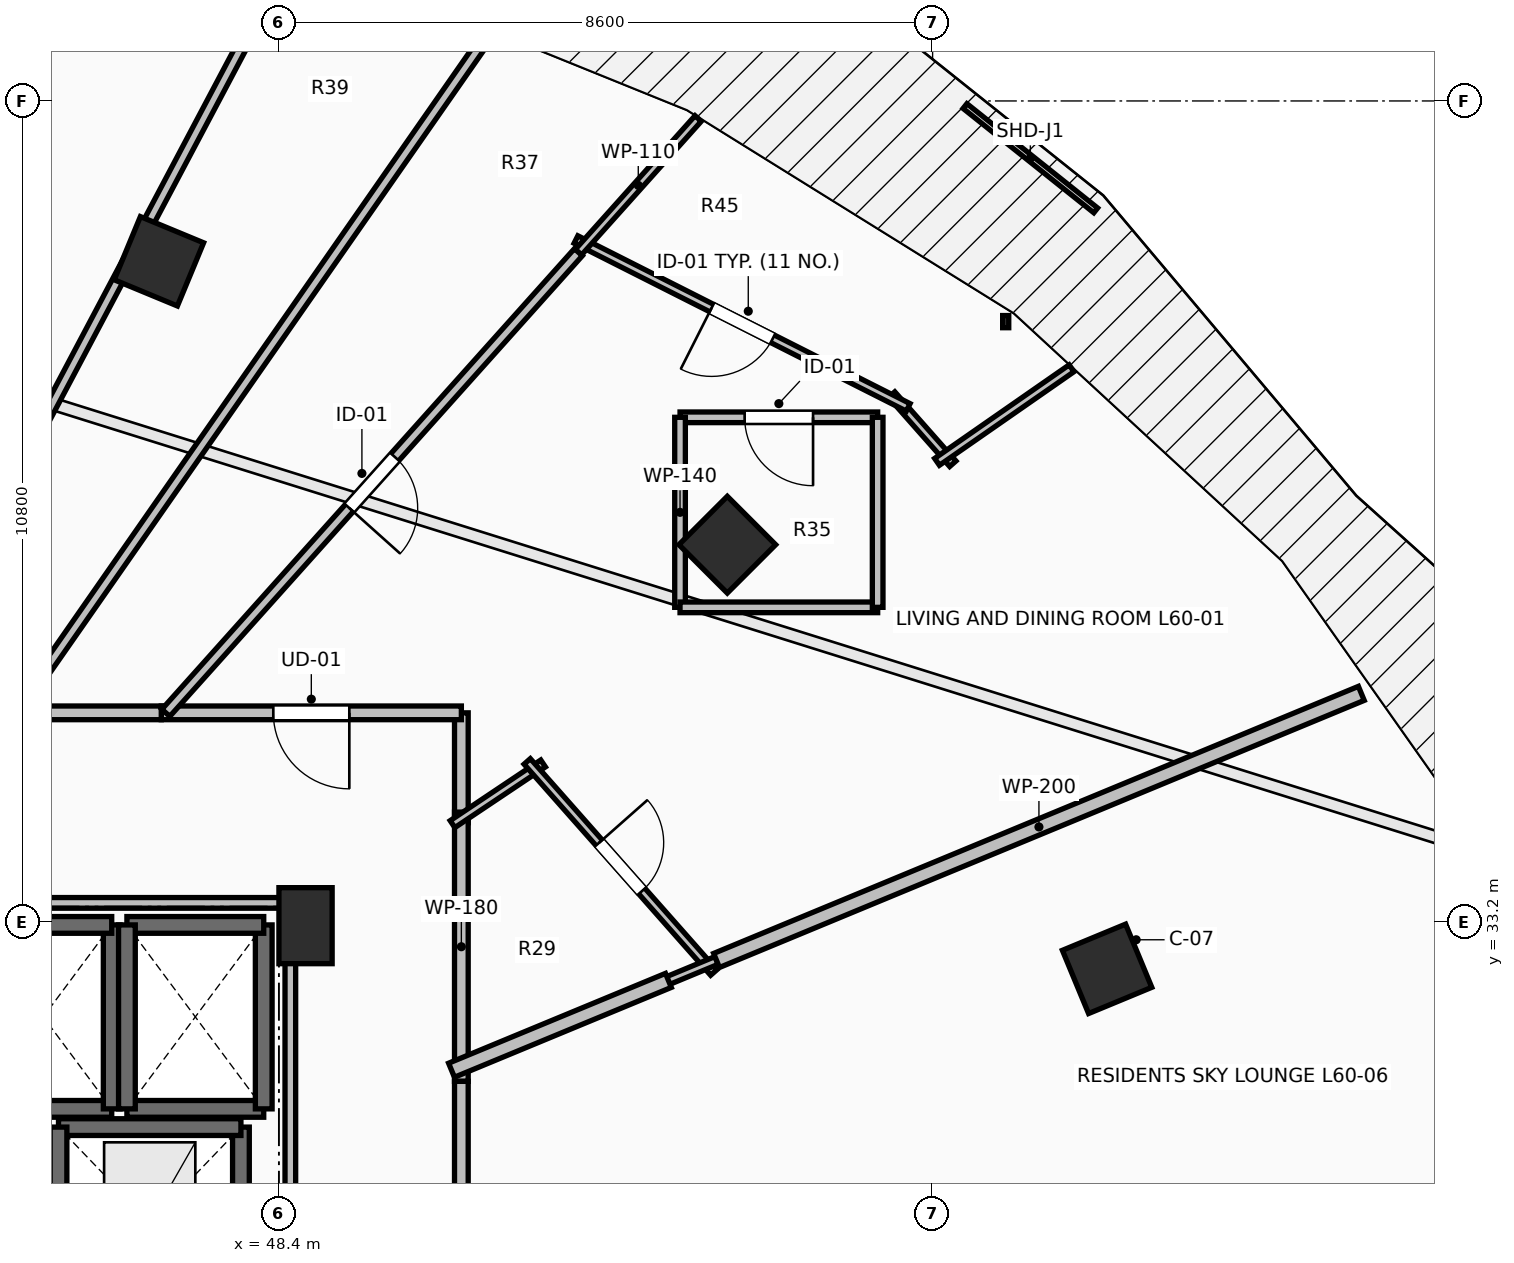
"""IFC4 building model, lengths in metres.
Left out: names, types, materials, properties, quantities, classifications, styles, units other than length and angle.
Written with IfcOpenShell. Run it as: python <this file> out.ifc"""

import sys

from ifc_helpers import new_model, si_unit, direction, frame, frame_2d, origin, origin_2d, place, context, subcontext, project, spatial, rectangle, extrude, element, fill, save


model = new_model("IFC4")
c1 = context("Model", 3, precision=1e-05, world=origin(), true_north=direction((0.0, 1.0)))
c2 = subcontext(c1, "Body", "Model", "MODEL_VIEW")
j1 = project(units=[si_unit("LENGTHUNIT", "METRE"), si_unit("PLANEANGLEUNIT", "RADIAN")], contexts=[c1])
p1 = place(None, origin())
s1 = spatial("IfcSite", under=j1, at=p1, CompositionType="ELEMENT")
p2 = place(p1, origin())
s2 = spatial("IfcBuilding", under=s1, at=p2, CompositionType="ELEMENT")
p3 = place(p2, frame((0.0, 0.0, 221.4)))
s3 = spatial("IfcBuildingStorey", under=s2, at=p3, CompositionType="ELEMENT", Elevation=221.4)
for number, where, z_axis, x_axis in (
    (1, (59.295, 32.582, 0.0), (0.0, 0.0, 1.0), (0.924, 0.383, 0.0)),
    (2, (54.299, 38.162, 0.0), (0.0, 0.0, 1.0), (0.707, 0.707, 0.0)),
    (3, (46.821, 41.891, 0.0), (0.0, 0.0, 1.0), (0.383, 0.924, 0.0)),
):
    element("IfcColumn", number, at=place(p3, frame(where, z_axis=z_axis, x_axis=x_axis)), inside=s3, PredefinedType="COLUMN", context=c2, shape_type="SweptSolid", body=[
        extrude(rectangle(XDim=0.9, YDim=0.9, at=origin_2d()), origin(), (0.0, 0.0, 1.0), 3.55),
    ])
p4 = place(p3, frame((48.75, 33.15, 0.0), z_axis=(0.0, 0.0, 1.0), x_axis=(1.0, 0.0, 0.0)))
e4 = element("IfcColumn", 4, at=p4, inside=s3, PredefinedType="PILASTER", context=c2, shape_type="SweptSolid", body=[
    extrude(rectangle(XDim=0.7, YDim=1.0, at=origin_2d()), origin(), (0.0, 0.0, 1.0), 3.55),
])
p5 = place(p3, frame((44.4, 30.74, 0.0), z_axis=(0.0, 0.0, 1.0), x_axis=(1.0, 0.0, 0.0)))
e5 = element("IfcWall", 5, at=p5, inside=s3, PredefinedType="SOLIDWALL", context=c2, shape_type="SweptSolid", body=[
    extrude(rectangle(XDim=1.8, YDim=0.22, at=frame_2d((0.9, 0.0))), origin(), (0.0, 0.0, 1.0), 3.2),
])
p6 = place(p3, frame((46.2, 30.74, 0.0), z_axis=(0.0, 0.0, 1.0), x_axis=(0.0, 1.0, 0.0)))
e6 = element("IfcWall", 6, at=p6, inside=s3, PredefinedType="SOLIDWALL", context=c2, shape_type="SweptSolid", body=[
    extrude(rectangle(XDim=2.42, YDim=0.22, at=frame_2d((1.21, 0.0))), origin(), (0.0, 0.0, 1.0), 3.2),
])
for number, where, z_axis, x_axis in (
    (7, (46.2, 33.16, 0.0), (0.0, 0.0, 1.0), (-1.0, 0.0, 0.0)),
    (8, (46.4, 30.74, 0.0), (0.0, 0.0, 1.0), (1.0, 0.0, 0.0)),
):
    element("IfcWall", number, at=place(p3, frame(where, z_axis=z_axis, x_axis=x_axis)), inside=s3, PredefinedType="SOLIDWALL", context=c2, shape_type="SweptSolid", body=[
        extrude(rectangle(XDim=1.8, YDim=0.22, at=frame_2d((0.9, 0.0))), origin(), (0.0, 0.0, 1.0), 3.2),
    ])
p7 = place(p3, frame((48.2, 30.74, 0.0), z_axis=(0.0, 0.0, 1.0), x_axis=(0.0, 1.0, 0.0)))
e9 = element("IfcWall", 9, at=p7, inside=s3, PredefinedType="SOLIDWALL", context=c2, shape_type="SweptSolid", body=[
    extrude(rectangle(XDim=2.42, YDim=0.22, at=frame_2d((1.21, 0.0))), origin(), (0.0, 0.0, 1.0), 3.2),
])
p8 = place(p3, frame((48.2, 33.16, 0.0), z_axis=(0.0, 0.0, 1.0), x_axis=(-1.0, 0.0, 0.0)))
e10 = element("IfcWall", 10, at=p8, inside=s3, PredefinedType="SOLIDWALL", context=c2, shape_type="SweptSolid", body=[
    extrude(rectangle(XDim=1.8, YDim=0.22, at=frame_2d((0.9, 0.0))), origin(), (0.0, 0.0, 1.0), 3.2),
])
p9 = place(p3, frame((46.4, 33.16, 0.0), z_axis=(0.0, 0.0, 1.0), x_axis=(0.0, -1.0, 0.0)))
e11 = element("IfcWall", 11, at=p9, inside=s3, PredefinedType="SOLIDWALL", context=c2, shape_type="SweptSolid", body=[
    extrude(rectangle(XDim=2.42, YDim=0.22, at=frame_2d((1.21, 0.0))), origin(), (0.0, 0.0, 1.0), 3.2),
])
p10 = place(p3, frame((47.9, 28.0, 0.0), z_axis=(0.0, 0.0, 1.0), x_axis=(0.0, 1.0, 0.0)))
e12 = element("IfcWall", 12, at=p10, inside=s3, PredefinedType="SHEAR", context=c2, shape_type="SweptSolid", body=[
    extrude(rectangle(XDim=2.5, YDim=0.22, at=frame_2d((1.25, 0.0))), origin(), (0.0, 0.0, 1.0), 3.2),
])
p11 = place(p3, frame((47.9, 30.5, 0.0), z_axis=(0.0, 0.0, 1.0), x_axis=(-1.0, 0.0, 0.0)))
e13 = element("IfcWall", 13, at=p11, inside=s3, PredefinedType="SHEAR", context=c2, shape_type="SweptSolid", body=[
    extrude(rectangle(XDim=2.4, YDim=0.22, at=frame_2d((1.2, 0.0))), origin(), (0.0, 0.0, 1.0), 3.2),
])
p12 = place(p3, frame((45.5, 30.5, 0.0), z_axis=(0.0, 0.0, 1.0), x_axis=(0.0, -1.0, 0.0)))
e14 = element("IfcWall", 14, at=p12, inside=s3, PredefinedType="SHEAR", context=c2, shape_type="SweptSolid", body=[
    extrude(rectangle(XDim=2.5, YDim=0.22, at=frame_2d((1.25, 0.0))), origin(), (0.0, 0.0, 1.0), 3.2),
])
p13 = place(p3, frame((50.8, 34.504, 0.0), z_axis=(0.0, 0.0, 1.0), x_axis=(0.0, 1.0, 0.0)))
e15 = element("IfcWall", 15, at=p13, inside=s3, PredefinedType="PARTITIONING", context=c2, shape_type="SweptSolid", body=[
    extrude(rectangle(XDim=1.446, YDim=0.18, at=frame_2d((0.723, 0.0))), origin(), (0.0, 0.0, 1.0), 2.392),
])
p14 = place(p3, frame((50.8, 35.95, 0.0), z_axis=(0.0, 0.0, 1.0), x_axis=(-1.0, 0.0, 0.0)))
e16 = element("IfcWall", 16, at=p14, inside=s3, PredefinedType="PARTITIONING", context=c2, shape_type="SweptSolid", body=[
    extrude(rectangle(XDim=3.948, YDim=0.18, at=frame_2d((1.974, 0.0))), origin(), (0.0, 0.0, 1.0), 2.392),
])
p15 = place(p14, frame((1.474, 0.0, 0.0)))
e17 = element("IfcOpeningElement", 17, at=p15, cuts=e16, PredefinedType="OPENING", context=c2, shape_type="SweptSolid", body=[
    extrude(rectangle(XDim=1.0, YDim=2.15, at=frame_2d((0.5, 1.075))), frame((0.0, 0.105, 0.0), z_axis=(0.0, -1.0, 0.0), x_axis=(1.0, 0.0, 0.0)), (0.0, 0.0, 1.0), 0.21),
])
p16 = place(p3, frame((50.8, 31.102, 0.0), z_axis=(0.0, 0.0, 1.0), x_axis=(0.0, 1.0, 0.0)))
e18 = element("IfcWall", 18, at=p16, inside=s3, PredefinedType="PARTITIONING", context=c2, shape_type="SweptSolid", body=[
    extrude(rectangle(XDim=3.542, YDim=0.18, at=frame_2d((1.771, 0.0))), origin(), (0.0, 0.0, 1.0), 2.392),
])
p17 = place(p3, frame((46.852, 35.95, 0.0), z_axis=(0.0, 0.0, 1.0), x_axis=(-1.0, 0.0, 0.0)))
e19 = element("IfcWall", 19, at=p17, inside=s3, PredefinedType="PARTITIONING", context=c2, shape_type="SweptSolid", body=[
    extrude(rectangle(XDim=1.977, YDim=0.18, at=frame_2d((0.989, 0.0))), origin(), (0.0, 0.0, 1.0), 3.2),
])
p18 = place(p3, frame((50.8, 27.25, 0.0), z_axis=(0.0, 0.0, 1.0), x_axis=(0.0, 1.0, 0.0)))
e20 = element("IfcWall", 20, at=p18, inside=s3, PredefinedType="PARTITIONING", context=c2, shape_type="SweptSolid", body=[
    extrude(rectangle(XDim=3.852, YDim=0.18, at=frame_2d((1.926, 0.0))), origin(), (0.0, 0.0, 1.0), 2.392),
])
p19 = place(p3, frame((50.684, 34.486, 0.0), z_axis=(0.0, 0.0, 1.0), x_axis=(0.830948636418, 0.556349138253, 0.0)))
e21 = element("IfcWall", 21, at=p19, inside=s3, PredefinedType="PARTITIONING", context=c2, shape_type="SweptSolid", body=[
    extrude(rectangle(XDim=1.434, YDim=0.11, at=frame_2d((0.717, 0.0))), origin(), (0.0, 0.0, 1.0), 2.834),
])
p20 = place(p3, frame((51.666, 35.311, 0.0), z_axis=(0.0, 0.0, 1.0), x_axis=(0.662288118602, -0.749249256228, 0.0)))
e22 = element("IfcWall", 22, at=p20, inside=s3, PredefinedType="PARTITIONING", context=c2, shape_type="SweptSolid", body=[
    extrude(rectangle(XDim=3.706, YDim=0.11, at=frame_2d((1.853, 0.0))), origin(), (0.0, 0.0, 1.0), 2.392),
])
p21 = place(p20, frame((1.428, 0.0, 0.0)))
e23 = element("IfcOpeningElement", 23, at=p21, cuts=e22, PredefinedType="OPENING", context=c2, shape_type="SweptSolid", body=[
    extrude(rectangle(XDim=0.85, YDim=2.1, at=frame_2d((0.425, 1.05))), frame((0.0, 0.07, 0.0), z_axis=(0.0, -1.0, 0.0), x_axis=(1.0, 0.0, 0.0)), (0.0, 0.0, 1.0), 0.14),
])
p22 = place(p3, frame((54.157, 32.693, 0.0), z_axis=(0.0, 0.0, 1.0), x_axis=(-0.923731903457, -0.383039646166, 0.0)))
e24 = element("IfcWall", 24, at=p22, inside=s3, PredefinedType="PARTITIONING", context=c2, shape_type="SweptSolid", body=[
    extrude(rectangle(XDim=0.825, YDim=0.11, at=frame_2d((0.413, 0.0))), origin(), (0.0, 0.0, 1.0), 2.392),
])
p23 = place(p3, frame((57.266, 39.227, 0.0), z_axis=(0.0, 0.0, 1.0), x_axis=(-0.662352650652, 0.749192209099, 0.0)))
e25 = element("IfcWall", 25, at=p23, inside=s3, PredefinedType="PARTITIONING", context=c2, shape_type="SweptSolid", body=[
    extrude(rectangle(XDim=1.215, YDim=0.11, at=frame_2d((0.607, 0.0))), origin(), (0.0, 0.0, 1.0), 3.2),
])
p24 = place(p3, frame((56.679, 39.969, 0.0), z_axis=(0.0, 0.0, 1.0), x_axis=(-0.892574903925, 0.450899147131, 0.0)))
e26 = element("IfcWall", 26, at=p24, inside=s3, PredefinedType="PARTITIONING", context=c2, shape_type="SweptSolid", body=[
    extrude(rectangle(XDim=4.897, YDim=0.11, at=frame_2d((2.448, 0.0))), origin(), (0.0, 0.0, 1.0), 3.2),
])
p25 = place(p24, frame((1.999, 0.0, 0.0)))
e27 = element("IfcOpeningElement", 27, at=p25, cuts=e26, PredefinedType="OPENING", context=c2, shape_type="SweptSolid", body=[
    extrude(rectangle(XDim=0.9, YDim=2.1, at=frame_2d((0.45, 1.05))), frame((0.0, 0.07, 0.0), z_axis=(0.0, -1.0, 0.0), x_axis=(1.0, 0.0, 0.0)), (0.0, 0.0, 1.0), 0.14),
])
p26 = place(p3, frame((52.34, 42.01, 0.0), z_axis=(0.0, 0.0, 1.0), x_axis=(0.667118090827, 0.744951980259, 0.0)))
e28 = element("IfcWall", 28, at=p26, inside=s3, PredefinedType="PARTITIONING", context=c2, shape_type="SweptSolid", body=[
    extrude(rectangle(XDim=2.362, YDim=0.11, at=frame_2d((1.181, 0.0))), origin(), (0.0, 0.0, 1.0), 3.2),
])
p27 = place(p3, frame((58.828, 40.483, 0.0), z_axis=(0.0, 0.0, 1.0), x_axis=(-0.820999835833, -0.570928427705, 0.0)))
e29 = element("IfcWall", 29, at=p27, inside=s3, PredefinedType="PARTITIONING", context=c2, shape_type="SweptSolid", body=[
    extrude(rectangle(XDim=2.156, YDim=0.11, at=frame_2d((1.078, 0.0))), origin(), (0.0, 0.0, 1.0), 3.2),
])
p28 = place(p3, frame((56.277, 39.838, 0.0), z_axis=(0.0, 0.0, 1.0), x_axis=(-1.0, 0.0, 0.0)))
e30 = element("IfcWall", 30, at=p28, inside=s3, PredefinedType="PARTITIONING", context=c2, shape_type="SweptSolid", body=[
    extrude(rectangle(XDim=2.6, YDim=0.14, at=frame_2d((1.3, 0.0))), origin(), (0.0, 0.0, 1.0), 3.2),
])
p29 = place(p28, frame((0.85, 0.0, 0.0)))
e31 = element("IfcOpeningElement", 31, at=p29, cuts=e30, PredefinedType="OPENING", context=c2, shape_type="SweptSolid", body=[
    extrude(rectangle(XDim=0.9, YDim=2.1, at=frame_2d((0.45, 1.05))), frame((0.0, 0.085, 0.0), z_axis=(0.0, -1.0, 0.0), x_axis=(1.0, 0.0, 0.0)), (0.0, 0.0, 1.0), 0.17),
])
p30 = place(p3, frame((53.677, 39.838, 0.0), z_axis=(0.0, 0.0, 1.0), x_axis=(0.0, -1.0, 0.0)))
e32 = element("IfcWall", 32, at=p30, inside=s3, PredefinedType="PARTITIONING", context=c2, shape_type="SweptSolid", body=[
    extrude(rectangle(XDim=2.5, YDim=0.14, at=frame_2d((1.25, 0.0))), origin(), (0.0, 0.0, 1.0), 2.392),
])
p31 = place(p3, frame((53.677, 37.338, 0.0), z_axis=(0.0, 0.0, 1.0), x_axis=(1.0, 0.0, 0.0)))
e33 = element("IfcWall", 33, at=p31, inside=s3, PredefinedType="PARTITIONING", context=c2, shape_type="SweptSolid", body=[
    extrude(rectangle(XDim=2.6, YDim=0.14, at=frame_2d((1.3, 0.0))), origin(), (0.0, 0.0, 1.0), 2.392),
])
p32 = place(p3, frame((56.277, 37.338, 0.0), z_axis=(0.0, 0.0, 1.0), x_axis=(0.0, 1.0, 0.0)))
e34 = element("IfcWall", 34, at=p32, inside=s3, PredefinedType="PARTITIONING", context=c2, shape_type="SweptSolid", body=[
    extrude(rectangle(XDim=2.5, YDim=0.14, at=frame_2d((1.25, 0.0))), origin(), (0.0, 0.0, 1.0), 3.2),
])
p33 = place(p3, frame((52.34, 42.01, 0.0), z_axis=(0.0, 0.0, 1.0), x_axis=(-0.667173742476, -0.744902139445, 0.0)))
e35 = element("IfcWall", 35, at=p33, inside=s3, PredefinedType="PARTITIONING", context=c2, shape_type="SweptSolid", body=[
    extrude(rectangle(XDim=8.135, YDim=0.14, at=frame_2d((4.067, 0.0))), origin(), (0.0, 0.0, 1.0), 2.392),
])
p34 = place(p33, frame((3.617, 0.0, 0.0)))
e36 = element("IfcOpeningElement", 36, at=p34, cuts=e35, PredefinedType="OPENING", context=c2, shape_type="SweptSolid", body=[
    extrude(rectangle(XDim=0.9, YDim=2.1, at=frame_2d((0.45, 1.05))), frame((0.0, 0.085, 0.0), z_axis=(0.0, -1.0, 0.0), x_axis=(1.0, 0.0, 0.0)), (0.0, 0.0, 1.0), 0.17),
])
p35 = place(p3, frame((54.157, 32.692, 0.0), z_axis=(0.0, 0.0, 1.0), x_axis=(0.923874230192, 0.382696233045, 0.0)))
e37 = element("IfcWall", 37, at=p35, inside=s3, PredefinedType="PARTITIONING", context=c2, shape_type="SweptSolid", body=[
    extrude(rectangle(XDim=9.181, YDim=0.2, at=frame_2d((4.591, 0.0))), origin(), (0.0, 0.0, 1.0), 2.392),
])
p36 = place(p3, frame((50.671, 31.248, 0.0), z_axis=(0.0, 0.0, 1.0), x_axis=(0.923905073908, 0.382621764158, 0.0)))
e38 = element("IfcWall", 38, at=p36, inside=s3, PredefinedType="PARTITIONING", context=c2, shape_type="SweptSolid", body=[
    extrude(rectangle(XDim=3.088, YDim=0.2, at=frame_2d((1.544, 0.0))), origin(), (0.0, 0.0, 1.0), 2.834),
])
p37 = place(p3, frame((51.099, 44.795, 0.0), z_axis=(0.0, 0.0, 1.0), x_axis=(-0.571754326018, -0.82042488424, 0.0)))
e39 = element("IfcWall", 39, at=p37, inside=s3, PredefinedType="PARTITIONING", context=c2, shape_type="SweptSolid", body=[
    extrude(rectangle(XDim=10.781, YDim=0.14, at=frame_2d((5.391, 0.0))), origin(), (0.0, 0.0, 1.0), 2.392),
])
p38 = place(p3, frame((48.482, 45.797, 0.0), z_axis=(0.0, 0.0, 1.0), x_axis=(-0.46793402924, -0.883763398359, 0.0)))
e40 = element("IfcWall", 40, at=p38, inside=s3, PredefinedType="PARTITIONING", context=c2, shape_type="SweptSolid", body=[
    extrude(rectangle(XDim=11.142, YDim=0.14, at=frame_2d((5.571, 0.0))), origin(), (0.0, 0.0, 1.0), 2.734),
])
p39 = place(p3, frame((45.805, 46.412, 0.0), z_axis=(0.0, 0.0, 1.0), x_axis=(-0.357119008819, -0.934058891901, 0.0)))
e41 = element("IfcWall", 41, at=p39, inside=s3, PredefinedType="PARTITIONING", context=c2, shape_type="SweptSolid", body=[
    extrude(rectangle(XDim=11.201, YDim=0.14, at=frame_2d((5.6, 0.0))), origin(), (0.0, 0.0, 1.0), 2.734),
])
p40 = place(p3, frame((48.55, 28.196, 0.0), z_axis=(0.0, 0.0, 1.0), x_axis=(0.0, 1.0, 0.0)))
e42 = element("IfcWall", 42, at=p40, inside=s3, PredefinedType="PARTITIONING", context=c2, shape_type="SweptSolid", body=[
    extrude(rectangle(XDim=5.254, YDim=0.14, at=frame_2d((2.627, 0.0))), origin(), (0.0, 0.0, 1.0), 2.392),
])
p41 = place(p3, frame((48.55, 33.45, 0.0), z_axis=(0.0, 0.0, 1.0), x_axis=(-1.0, 0.0, 0.0)))
e43 = element("IfcWall", 43, at=p41, inside=s3, PredefinedType="PARTITIONING", context=c2, shape_type="SweptSolid", body=[
    extrude(rectangle(XDim=4.21, YDim=0.14, at=frame_2d((2.105, 0.0))), origin(), (0.0, 0.0, 1.0), 2.392),
])
p42 = place(p15, origin())
e44 = element("IfcDoor", 44, at=p42, inside=s3, OperationType="SINGLE_SWING_LEFT", PredefinedType="DOOR", context=c2, shape_type="SweptSolid", body=[
    extrude(rectangle(XDim=1.0, YDim=2.15, at=frame_2d((0.5, 1.075))), frame((0.0, 0.025, 0.0), z_axis=(0.0, -1.0, 0.0), x_axis=(1.0, 0.0, 0.0)), (0.0, 0.0, 1.0), 0.05),
])
fill(e17, e44)
p43 = place(p21, origin())
e45 = element("IfcDoor", 45, at=p43, inside=s3, OperationType="SINGLE_SWING_LEFT", PredefinedType="DOOR", context=c2, shape_type="SweptSolid", body=[
    extrude(rectangle(XDim=0.85, YDim=2.1, at=frame_2d((0.425, 1.05))), frame((0.0, 0.025, 0.0), z_axis=(0.0, -1.0, 0.0), x_axis=(1.0, 0.0, 0.0)), (0.0, 0.0, 1.0), 0.05),
])
fill(e23, e45)
p44 = place(p25, origin())
e46 = element("IfcDoor", 46, at=p44, inside=s3, OperationType="SINGLE_SWING_RIGHT", PredefinedType="DOOR", context=c2, shape_type="SweptSolid", body=[
    extrude(rectangle(XDim=0.9, YDim=2.1, at=frame_2d((0.45, 1.05))), frame((0.0, 0.025, 0.0), z_axis=(0.0, -1.0, 0.0), x_axis=(1.0, 0.0, 0.0)), (0.0, 0.0, 1.0), 0.05),
])
fill(e27, e46)
p45 = place(p29, origin())
e47 = element("IfcDoor", 47, at=p45, inside=s3, OperationType="SINGLE_SWING_LEFT", PredefinedType="DOOR", context=c2, shape_type="SweptSolid", body=[
    extrude(rectangle(XDim=0.9, YDim=2.1, at=frame_2d((0.45, 1.05))), frame((0.0, 0.025, 0.0), z_axis=(0.0, -1.0, 0.0), x_axis=(1.0, 0.0, 0.0)), (0.0, 0.0, 1.0), 0.05),
])
fill(e31, e47)
p46 = place(p34, origin())
e48 = element("IfcDoor", 48, at=p46, inside=s3, OperationType="SINGLE_SWING_RIGHT", PredefinedType="DOOR", context=c2, shape_type="SweptSolid", body=[
    extrude(rectangle(XDim=0.9, YDim=2.1, at=frame_2d((0.45, 1.05))), frame((0.0, 0.025, 0.0), z_axis=(0.0, -1.0, 0.0), x_axis=(1.0, 0.0, 0.0)), (0.0, 0.0, 1.0), 0.05),
])
fill(e36, e48)
save(model, sys.argv[1])
